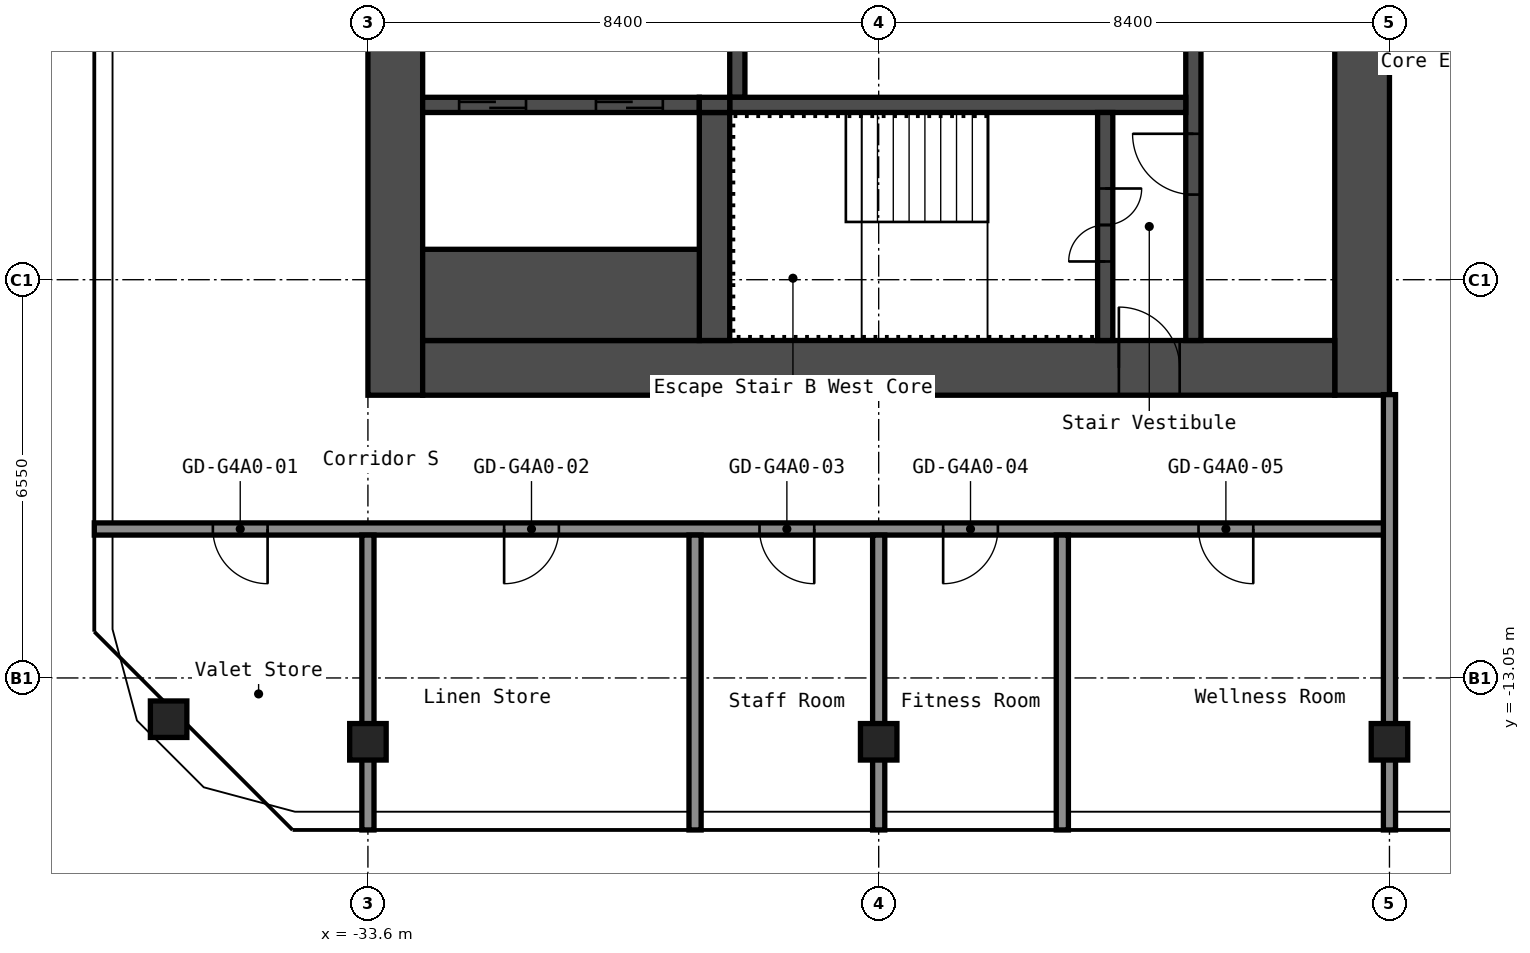
"""IFC4 building model, lengths in metres.
Left out: names, types, materials, properties, quantities, classifications, styles, units other than length and angle.
Written with IfcOpenShell. Run it as: python <this file> out.ifc"""

import sys

from ifc_helpers import new_model, si_unit, direction, frame, frame_2d, origin, origin_2d, place, context, subcontext, project, spatial, rectangle, hollow_rectangle, extrude, element, fill, save


model = new_model("IFC4")
c1 = context("Model", 3, precision=1e-05, world=origin(), true_north=direction((0.0, 1.0)))
c2 = subcontext(c1, "Body", "Model", "MODEL_VIEW")
j1 = project(units=[si_unit("LENGTHUNIT", "METRE"), si_unit("PLANEANGLEUNIT", "RADIAN")], contexts=[c1])
p1 = place(None, origin())
s1 = spatial("IfcSite", under=j1, at=p1, CompositionType="ELEMENT")
p2 = place(p1, origin())
s2 = spatial("IfcBuilding", under=s1, at=p2, CompositionType="ELEMENT")
p3 = place(p2, frame((0.0, 0.0, 186.6)))
s3 = spatial("IfcBuildingStorey", under=s2, at=p3, CompositionType="ELEMENT", Elevation=186.6)
for number, where, z_axis, x_axis in (
    (1, (-36.878, -13.729, 0.0), (0.0, 0.0, 1.0), (1.0, 0.0, 0.0)),
    (2, (-33.6, -14.1, 0.0), (0.0, 0.0, 1.0), (1.0, 0.0, 0.0)),
    (3, (-25.2, -14.1, 0.0), (0.0, 0.0, 1.0), (1.0, 0.0, 0.0)),
    (4, (-16.8, -14.1, 0.0), (0.0, 0.0, 1.0), (1.0, 0.0, 0.0)),
):
    element("IfcColumn", number, at=place(p3, frame(where, z_axis=z_axis, x_axis=x_axis)), inside=s3, PredefinedType="COLUMN", context=c2, shape_type="SweptSolid", body=[
        extrude(hollow_rectangle(XDim=0.6, YDim=0.6, WallThickness=0.025, InnerFilletRadius=0.038, OuterFilletRadius=0.062, at=origin_2d()), origin(), (0.0, 0.0, 1.0), 2.75),
    ])
p4 = place(p3, frame((-17.25, -8.4, 0.0), z_axis=(0.0, 0.0, 1.0), x_axis=(0.0, 1.0, 0.0)))
e5 = element("IfcWall", 5, at=p4, inside=s3, PredefinedType="SHEAR", context=c2, shape_type="SweptSolid", body=[
    extrude(rectangle(XDim=16.8, YDim=0.9, at=frame_2d((8.4, 0.0))), origin(), (0.0, 0.0, 1.0), 2.75),
])
p5 = place(p4, frame((10.1, 0.0, 0.0)))
e6 = element("IfcOpeningElement", 6, at=p5, cuts=e5, PredefinedType="OPENING", context=c2, shape_type="SweptSolid", body=[
    extrude(rectangle(XDim=1.6, YDim=2.1, at=frame_2d((0.8, 1.05))), frame((0.0, 0.46, 0.0), z_axis=(0.0, -1.0, 0.0), x_axis=(1.0, 0.0, 0.0)), (0.0, 0.0, 1.0), 0.92),
])
p6 = place(p3, frame((-33.15, -8.4, 0.0), z_axis=(0.0, 0.0, 1.0), x_axis=(0.0, 1.0, 0.0)))
e7 = element("IfcWall", 7, at=p6, inside=s3, PredefinedType="SHEAR", context=c2, shape_type="SweptSolid", body=[
    extrude(rectangle(XDim=16.8, YDim=0.9, at=frame_2d((8.4, 0.0))), origin(), (0.0, 0.0, 1.0), 2.75),
])
p7 = place(p3, frame((-32.7, -7.95, 0.0), z_axis=(0.0, 0.0, 1.0), x_axis=(1.0, 0.0, 0.0)))
e8 = element("IfcWall", 8, at=p7, inside=s3, PredefinedType="SHEAR", context=c2, shape_type="SweptSolid", body=[
    extrude(rectangle(XDim=15.0, YDim=0.9, at=frame_2d((7.5, 0.0))), origin(), (0.0, 0.0, 1.0), 2.75),
])
p8 = place(p7, frame((11.45, 0.0, 0.0)))
e9 = element("IfcOpeningElement", 9, at=p8, cuts=e8, PredefinedType="OPENING", context=c2, shape_type="SweptSolid", body=[
    extrude(rectangle(XDim=1.0, YDim=2.1, at=frame_2d((0.5, 1.05))), frame((0.0, 0.46, 0.0), z_axis=(0.0, -1.0, 0.0), x_axis=(1.0, 0.0, 0.0)), (0.0, 0.0, 1.0), 0.92),
])
p9 = place(p3, frame((-20.025, -7.5, 0.0), z_axis=(0.0, 0.0, 1.0), x_axis=(0.0, 1.0, 0.0)))
e10 = element("IfcWall", 10, at=p9, inside=s3, PredefinedType="SHEAR", context=c2, shape_type="SweptSolid", body=[
    extrude(rectangle(XDim=6.3, YDim=0.25, at=frame_2d((3.15, 0.0))), origin(), (0.0, 0.0, 1.0), 2.75),
])
p10 = place(p9, frame((2.4, 0.0, 0.0)))
e11 = element("IfcOpeningElement", 11, at=p10, cuts=e10, PredefinedType="OPENING", context=c2, shape_type="SweptSolid", body=[
    extrude(rectangle(XDim=1.0, YDim=2.1, at=frame_2d((0.5, 1.05))), frame((0.0, 0.135, 0.0), z_axis=(0.0, -1.0, 0.0), x_axis=(1.0, 0.0, 0.0)), (0.0, 0.0, 1.0), 0.27),
])
p11 = place(p3, frame((-27.525, -3.5, 0.0), z_axis=(0.0, 0.0, 1.0), x_axis=(0.0, 1.0, 0.0)))
e12 = element("IfcWall", 12, at=p11, inside=s3, PredefinedType="SHEAR", context=c2, shape_type="SweptSolid", body=[
    extrude(rectangle(XDim=2.05, YDim=0.25, at=frame_2d((1.025, 0.0))), origin(), (0.0, 0.0, 1.0), 2.75),
])
p12 = place(p3, frame((-27.65, -3.625, 0.0), z_axis=(0.0, 0.0, 1.0), x_axis=(1.0, 0.0, 0.0)))
e13 = element("IfcWall", 13, at=p12, inside=s3, PredefinedType="SHEAR", context=c2, shape_type="SweptSolid", body=[
    extrude(rectangle(XDim=7.5, YDim=0.25, at=frame_2d((3.75, 0.0))), origin(), (0.0, 0.0, 1.0), 2.75),
])
p13 = place(p3, frame((-21.475, -7.5, 0.0), z_axis=(0.0, 0.0, 1.0), x_axis=(0.0, 1.0, 0.0)))
e14 = element("IfcWall", 14, at=p13, inside=s3, PredefinedType="SHEAR", context=c2, shape_type="SweptSolid", body=[
    extrude(rectangle(XDim=3.75, YDim=0.25, at=frame_2d((1.875, 0.0))), origin(), (0.0, 0.0, 1.0), 2.75),
])
p14 = place(p13, frame((1.3, 0.0, 0.0)))
e15 = element("IfcOpeningElement", 15, at=p14, cuts=e14, PredefinedType="OPENING", context=c2, shape_type="SweptSolid", body=[
    extrude(rectangle(XDim=1.2, YDim=2.1, at=frame_2d((0.6, 1.05))), frame((0.0, 0.135, 0.0), z_axis=(0.0, -1.0, 0.0), x_axis=(1.0, 0.0, 0.0)), (0.0, 0.0, 1.0), 0.27),
])
p15 = place(p3, frame((-27.9, -7.5, 0.0), z_axis=(0.0, 0.0, 1.0), x_axis=(0.0, 1.0, 0.0)))
e16 = element("IfcWall", 16, at=p15, inside=s3, PredefinedType="SHEAR", context=c2, shape_type="SweptSolid", body=[
    extrude(rectangle(XDim=3.75, YDim=0.5, at=frame_2d((1.875, 0.0))), origin(), (0.0, 0.0, 1.0), 2.75),
])
p16 = place(p3, frame((-32.7, -3.625, 0.0), z_axis=(0.0, 0.0, 1.0), x_axis=(1.0, 0.0, 0.0)))
e17 = element("IfcWall", 17, at=p16, inside=s3, PredefinedType="SHEAR", context=c2, shape_type="SweptSolid", body=[
    extrude(rectangle(XDim=4.55, YDim=0.25, at=frame_2d((2.275, 0.0))), origin(), (0.0, 0.0, 1.0), 2.75),
])
p17 = place(p16, frame((2.85, 0.0, 0.0)))
e18 = element("IfcOpeningElement", 18, at=p17, cuts=e17, PredefinedType="OPENING", context=c2, shape_type="SweptSolid", body=[
    extrude(rectangle(XDim=1.1, YDim=2.1, at=frame_2d((0.55, 1.05))), frame((0.0, 0.135, 0.0), z_axis=(0.0, -1.0, 0.0), x_axis=(1.0, 0.0, 0.0)), (0.0, 0.0, 1.0), 0.27),
])
p18 = place(p16, frame((0.6, 0.0, 0.0)))
e19 = element("IfcOpeningElement", 19, at=p18, cuts=e17, PredefinedType="OPENING", context=c2, shape_type="SweptSolid", body=[
    extrude(rectangle(XDim=1.1, YDim=2.1, at=frame_2d((0.55, 1.05))), frame((0.0, 0.135, 0.0), z_axis=(0.0, -1.0, 0.0), x_axis=(1.0, 0.0, 0.0)), (0.0, 0.0, 1.0), 0.27),
])
p19 = place(p3, frame((-32.7, -6.75, 0.0), z_axis=(0.0, 0.0, 1.0), x_axis=(1.0, 0.0, 0.0)))
e20 = element("IfcWall", 20, at=p19, inside=s3, PredefinedType="SHEAR", context=c2, shape_type="SweptSolid", body=[
    extrude(rectangle(XDim=4.55, YDim=1.5, at=frame_2d((2.275, 0.0))), origin(), (0.0, 0.0, 1.0), 2.75),
])
p20 = place(p3, frame((-28.15, -3.625, 0.0), z_axis=(0.0, 0.0, 1.0), x_axis=(1.0, 0.0, 0.0)))
e21 = element("IfcWall", 21, at=p20, inside=s3, PredefinedType="SHEAR", context=c2, shape_type="SweptSolid", body=[
    extrude(rectangle(XDim=0.5, YDim=0.25, at=frame_2d((0.25, 0.0))), origin(), (0.0, 0.0, 1.0), 2.75),
])
p21 = place(p3, frame((-38.1, -10.6, 0.0), z_axis=(0.0, 0.0, 1.0), x_axis=(1.0, 0.0, 0.0)))
e22 = element("IfcWall", 22, at=p21, inside=s3, PredefinedType="PARTITIONING", context=c2, shape_type="SweptSolid", body=[
    extrude(rectangle(XDim=21.3, YDim=0.2, at=frame_2d((10.65, 0.0))), origin(), (0.0, 0.0, 1.0), 2.75),
])
p22 = place(p21, frame((1.95, 0.0, 0.0)))
e23 = element("IfcOpeningElement", 23, at=p22, cuts=e22, PredefinedType="OPENING", context=c2, shape_type="SweptSolid", body=[
    extrude(rectangle(XDim=0.9, YDim=2.1, at=frame_2d((0.45, 1.05))), frame((0.0, 0.11, 0.0), z_axis=(0.0, -1.0, 0.0), x_axis=(1.0, 0.0, 0.0)), (0.0, 0.0, 1.0), 0.22),
])
p23 = place(p21, frame((6.74, 0.0, 0.0)))
e24 = element("IfcOpeningElement", 24, at=p23, cuts=e22, PredefinedType="OPENING", context=c2, shape_type="SweptSolid", body=[
    extrude(rectangle(XDim=0.9, YDim=2.1, at=frame_2d((0.45, 1.05))), frame((0.0, 0.11, 0.0), z_axis=(0.0, -1.0, 0.0), x_axis=(1.0, 0.0, 0.0)), (0.0, 0.0, 1.0), 0.22),
])
p24 = place(p21, frame((10.94, 0.0, 0.0)))
e25 = element("IfcOpeningElement", 25, at=p24, cuts=e22, PredefinedType="OPENING", context=c2, shape_type="SweptSolid", body=[
    extrude(rectangle(XDim=0.9, YDim=2.1, at=frame_2d((0.45, 1.05))), frame((0.0, 0.11, 0.0), z_axis=(0.0, -1.0, 0.0), x_axis=(1.0, 0.0, 0.0)), (0.0, 0.0, 1.0), 0.22),
])
p25 = place(p21, frame((13.96, 0.0, 0.0)))
e26 = element("IfcOpeningElement", 26, at=p25, cuts=e22, PredefinedType="OPENING", context=c2, shape_type="SweptSolid", body=[
    extrude(rectangle(XDim=0.9, YDim=2.1, at=frame_2d((0.45, 1.05))), frame((0.0, 0.11, 0.0), z_axis=(0.0, -1.0, 0.0), x_axis=(1.0, 0.0, 0.0)), (0.0, 0.0, 1.0), 0.22),
])
p26 = place(p21, frame((18.16, 0.0, 0.0)))
e27 = element("IfcOpeningElement", 27, at=p26, cuts=e22, PredefinedType="OPENING", context=c2, shape_type="SweptSolid", body=[
    extrude(rectangle(XDim=0.9, YDim=2.1, at=frame_2d((0.45, 1.05))), frame((0.0, 0.11, 0.0), z_axis=(0.0, -1.0, 0.0), x_axis=(1.0, 0.0, 0.0)), (0.0, 0.0, 1.0), 0.22),
])
for number, where, z_axis, x_axis in (
    (28, (-33.6, -15.55, 0.0), (0.0, 0.0, 1.0), (0.0, 1.0, 0.0)),
    (29, (-28.22, -15.55, 0.0), (0.0, 0.0, 1.0), (0.0, 1.0, 0.0)),
    (30, (-25.2, -15.55, 0.0), (0.0, 0.0, 1.0), (0.0, 1.0, 0.0)),
    (31, (-22.18, -15.55, 0.0), (0.0, 0.0, 1.0), (0.0, 1.0, 0.0)),
):
    element("IfcWall", number, at=place(p3, frame(where, z_axis=z_axis, x_axis=x_axis)), inside=s3, PredefinedType="PARTITIONING", context=c2, shape_type="SweptSolid", body=[
        extrude(rectangle(XDim=4.85, YDim=0.2, at=frame_2d((2.425, 0.0))), origin(), (0.0, 0.0, 1.0), 2.75),
    ])
p27 = place(p3, frame((-16.8, -15.55, 0.0), z_axis=(0.0, 0.0, 1.0), x_axis=(0.0, 1.0, 0.0)))
e32 = element("IfcWall", 32, at=p27, inside=s3, PredefinedType="PARTITIONING", context=c2, shape_type="SweptSolid", body=[
    extrude(rectangle(XDim=7.16, YDim=0.2, at=frame_2d((3.58, 0.0))), origin(), (0.0, 0.0, 1.0), 2.75),
])
p28 = place(p8, origin())
e33 = element("IfcDoor", 33, at=p28, inside=s3, OperationType="SINGLE_SWING_RIGHT", PredefinedType="DOOR", context=c2, shape_type="SweptSolid", body=[
    extrude(rectangle(XDim=1.0, YDim=2.1, at=frame_2d((0.5, 1.05))), frame((0.0, 0.025, 0.0), z_axis=(0.0, -1.0, 0.0), x_axis=(1.0, 0.0, 0.0)), (0.0, 0.0, 1.0), 0.05),
])
fill(e9, e33)
p29 = place(p14, origin())
e34 = element("IfcDoor", 34, at=p29, inside=s3, OperationType="DOUBLE_DOOR_SINGLE_SWING", PredefinedType="DOOR", context=c2, shape_type="SweptSolid", body=[
    extrude(rectangle(XDim=1.2, YDim=2.1, at=frame_2d((0.6, 1.05))), frame((0.0, 0.025, 0.0), z_axis=(0.0, -1.0, 0.0), x_axis=(1.0, 0.0, 0.0)), (0.0, 0.0, 1.0), 0.05),
])
fill(e15, e34)
p30 = place(p10, origin())
e35 = element("IfcDoor", 35, at=p30, inside=s3, OperationType="SINGLE_SWING_LEFT", PredefinedType="DOOR", context=c2, shape_type="SweptSolid", body=[
    extrude(rectangle(XDim=1.0, YDim=2.1, at=frame_2d((0.5, 1.05))), frame((0.0, 0.025, 0.0), z_axis=(0.0, -1.0, 0.0), x_axis=(1.0, 0.0, 0.0)), (0.0, 0.0, 1.0), 0.05),
])
fill(e11, e35)
p31 = place(p17, origin())
e36 = element("IfcDoor", 36, at=p31, inside=s3, OperationType="DOUBLE_DOOR_SLIDING", PredefinedType="DOOR", context=c2, shape_type="SweptSolid", body=[
    extrude(rectangle(XDim=1.1, YDim=2.1, at=frame_2d((0.55, 1.05))), frame((0.0, 0.025, 0.0), z_axis=(0.0, -1.0, 0.0), x_axis=(1.0, 0.0, 0.0)), (0.0, 0.0, 1.0), 0.05),
])
fill(e18, e36)
p32 = place(p18, origin())
e37 = element("IfcDoor", 37, at=p32, inside=s3, OperationType="DOUBLE_DOOR_SLIDING", PredefinedType="DOOR", context=c2, shape_type="SweptSolid", body=[
    extrude(rectangle(XDim=1.1, YDim=2.1, at=frame_2d((0.55, 1.05))), frame((0.0, 0.025, 0.0), z_axis=(0.0, -1.0, 0.0), x_axis=(1.0, 0.0, 0.0)), (0.0, 0.0, 1.0), 0.05),
])
fill(e19, e37)
p33 = place(p22, origin())
e38 = element("IfcDoor", 38, at=p33, inside=s3, OperationType="SINGLE_SWING_RIGHT", PredefinedType="DOOR", context=c2, shape_type="SweptSolid", body=[
    extrude(rectangle(XDim=0.9, YDim=2.1, at=frame_2d((0.45, 1.05))), frame((0.0, 0.025, 0.0), z_axis=(0.0, -1.0, 0.0), x_axis=(1.0, 0.0, 0.0)), (0.0, 0.0, 1.0), 0.05),
])
fill(e23, e38)
p34 = place(p23, origin())
e39 = element("IfcDoor", 39, at=p34, inside=s3, OperationType="SINGLE_SWING_LEFT", PredefinedType="DOOR", context=c2, shape_type="SweptSolid", body=[
    extrude(rectangle(XDim=0.9, YDim=2.1, at=frame_2d((0.45, 1.05))), frame((0.0, 0.025, 0.0), z_axis=(0.0, -1.0, 0.0), x_axis=(1.0, 0.0, 0.0)), (0.0, 0.0, 1.0), 0.05),
])
fill(e24, e39)
p35 = place(p24, origin())
e40 = element("IfcDoor", 40, at=p35, inside=s3, OperationType="SINGLE_SWING_RIGHT", PredefinedType="DOOR", context=c2, shape_type="SweptSolid", body=[
    extrude(rectangle(XDim=0.9, YDim=2.1, at=frame_2d((0.45, 1.05))), frame((0.0, 0.025, 0.0), z_axis=(0.0, -1.0, 0.0), x_axis=(1.0, 0.0, 0.0)), (0.0, 0.0, 1.0), 0.05),
])
fill(e25, e40)
p36 = place(p25, origin())
e41 = element("IfcDoor", 41, at=p36, inside=s3, OperationType="SINGLE_SWING_LEFT", PredefinedType="DOOR", context=c2, shape_type="SweptSolid", body=[
    extrude(rectangle(XDim=0.9, YDim=2.1, at=frame_2d((0.45, 1.05))), frame((0.0, 0.025, 0.0), z_axis=(0.0, -1.0, 0.0), x_axis=(1.0, 0.0, 0.0)), (0.0, 0.0, 1.0), 0.05),
])
fill(e26, e41)
p37 = place(p26, origin())
e42 = element("IfcDoor", 42, at=p37, inside=s3, OperationType="SINGLE_SWING_RIGHT", PredefinedType="DOOR", context=c2, shape_type="SweptSolid", body=[
    extrude(rectangle(XDim=0.9, YDim=2.1, at=frame_2d((0.45, 1.05))), frame((0.0, 0.025, 0.0), z_axis=(0.0, -1.0, 0.0), x_axis=(1.0, 0.0, 0.0)), (0.0, 0.0, 1.0), 0.05),
])
fill(e27, e42)
save(model, sys.argv[1])
